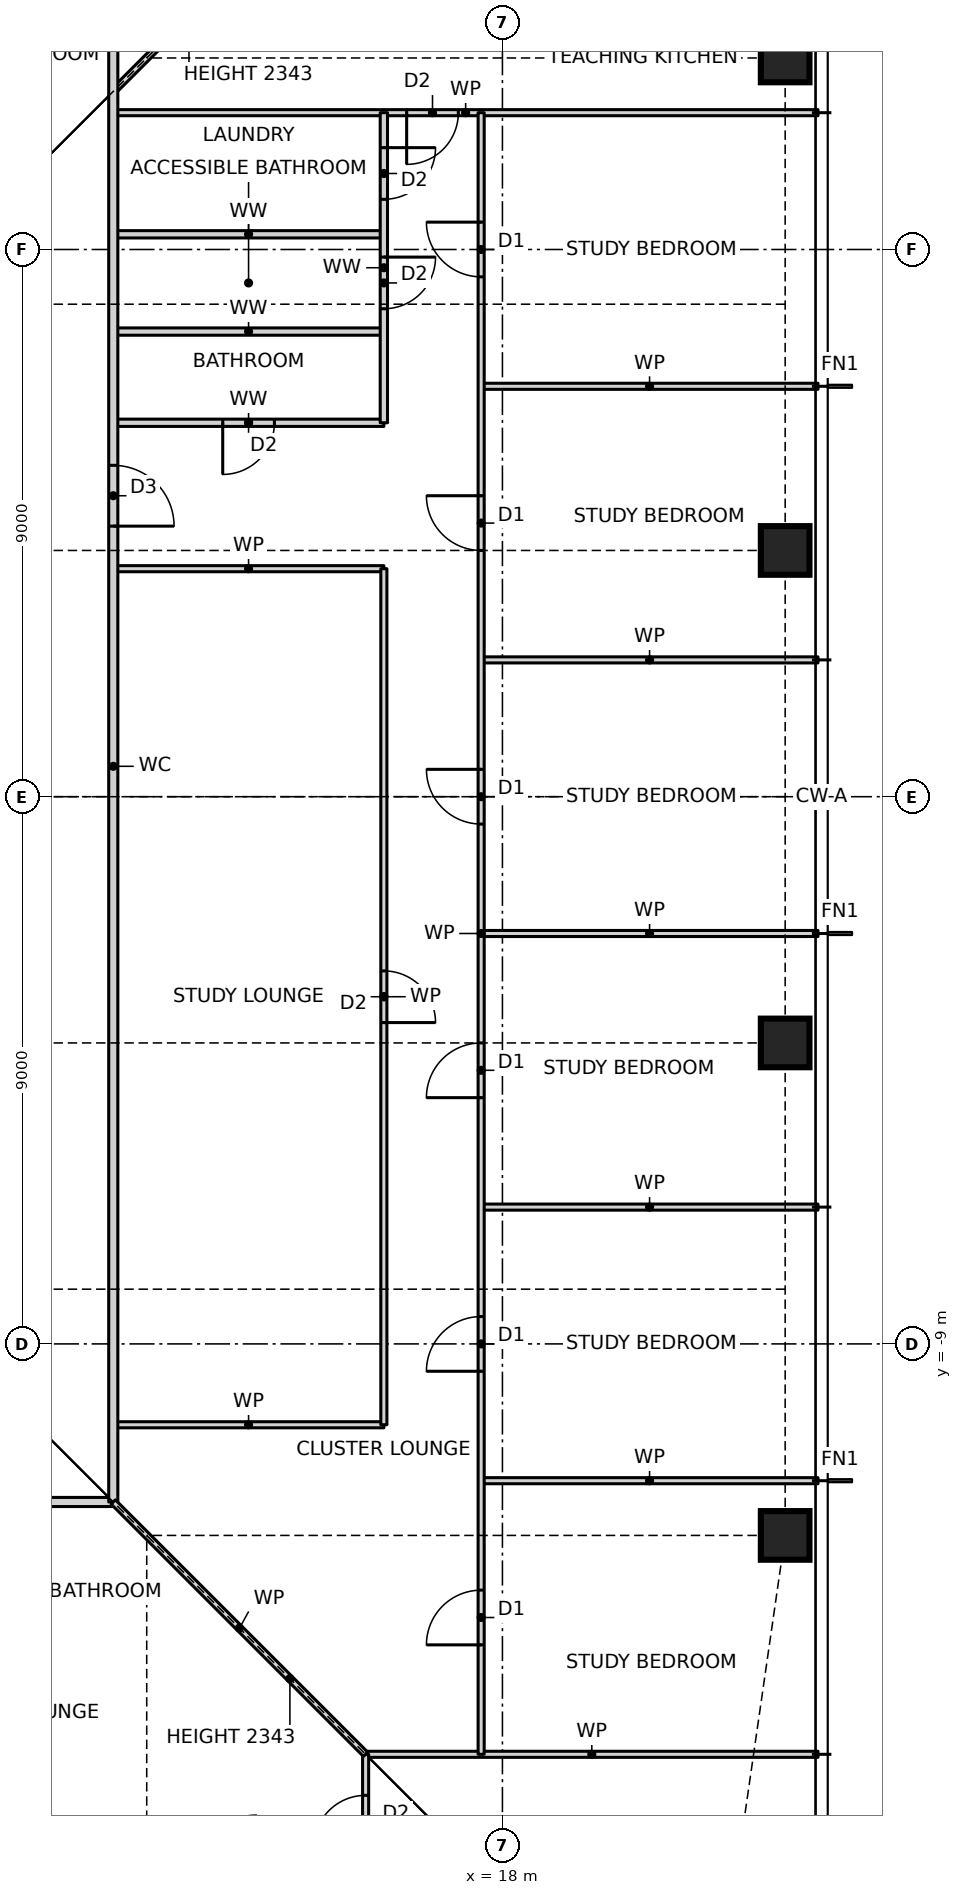
"""IFC4 building model, lengths in metres.
Left out: names, types, materials, properties, quantities, classifications, styles, units other than length and angle.
Written with IfcOpenShell. Run it as: python <this file> out.ifc"""

import sys

from ifc_helpers import new_model, si_unit, direction, frame, frame_2d, origin, origin_2d, place, context, subcontext, project, spatial, rectangle, hollow_rectangle, extrude, element, fill, save


model = new_model("IFC4")
c1 = context("Model", 3, precision=1e-05, world=origin(), true_north=direction((0.0, 1.0)))
c2 = subcontext(c1, "Body", "Model", "MODEL_VIEW")
j1 = project(units=[si_unit("LENGTHUNIT", "METRE"), si_unit("PLANEANGLEUNIT", "RADIAN")], contexts=[c1])
p1 = place(None, origin())
s1 = spatial("IfcSite", under=j1, at=p1, CompositionType="ELEMENT")
p2 = place(p1, origin())
s2 = spatial("IfcBuilding", under=s1, at=p2, CompositionType="ELEMENT")
p3 = place(p2, frame((0.0, 0.0, 57.0)))
s3 = spatial("IfcBuildingStorey", under=s2, at=p3, CompositionType="ELEMENT", Elevation=57.0)
for number, where, z_axis, x_axis in (
    (1, (22.65, -12.15, 0.0), (0.0, 0.0, 1.0), (1.0, 0.0, 0.0)),
    (2, (22.65, -4.05, 0.0), (0.0, 0.0, 1.0), (1.0, 0.0, 0.0)),
    (3, (22.65, 4.05, 0.0), (0.0, 0.0, 1.0), (1.0, 0.0, 0.0)),
    (4, (22.65, 12.15, 0.0), (0.0, 0.0, 1.0), (1.0, 0.0, 0.0)),
):
    element("IfcColumn", number, at=place(p3, frame(where, z_axis=z_axis, x_axis=x_axis)), inside=s3, PredefinedType="COLUMN", context=c2, shape_type="SweptSolid", body=[
        extrude(hollow_rectangle(XDim=0.8, YDim=0.8, WallThickness=0.09, at=origin_2d()), origin(), (0.0, 0.0, 1.0), 3.5),
    ])
p4 = place(p3, frame((15.75, -15.75, 0.0), z_axis=(0.0, 0.0, 1.0), x_axis=(1.0, 0.0, 0.0)))
e5 = element("IfcWall", 5, at=p4, inside=s3, PredefinedType="PARTITIONING", context=c2, shape_type="SweptSolid", body=[
    extrude(rectangle(XDim=7.44, YDim=0.1, at=frame_2d((3.72, 0.0))), origin(), (0.0, 0.0, 1.0), 3.27),
])
p5 = place(p3, frame((-11.6, -11.6, 0.0), z_axis=(0.0, 0.0, 1.0), x_axis=(1.0, 0.0, 0.0)))
e6 = element("IfcWall", 6, at=p5, inside=s3, PredefinedType="PARTITIONING", context=c2, shape_type="SweptSolid", body=[
    extrude(rectangle(XDim=23.2, YDim=0.15, at=frame_2d((11.6, 0.0))), origin(), (0.0, 0.0, 1.0), 3.27),
])
p6 = place(p5, frame((1.755, 0.0, 0.0)))
e7 = element("IfcOpeningElement", 7, at=p6, cuts=e6, PredefinedType="OPENING", context=c2, shape_type="SweptSolid", body=[
    extrude(rectangle(XDim=1.0, YDim=2.1, at=frame_2d((0.5, 1.05))), frame((0.0, 0.085, 0.0), z_axis=(0.0, -1.0, 0.0), x_axis=(1.0, 0.0, 0.0)), (0.0, 0.0, 1.0), 0.17),
])
p7 = place(p5, frame((21.025, 0.0, 0.0)))
e8 = element("IfcOpeningElement", 8, at=p7, cuts=e6, PredefinedType="OPENING", context=c2, shape_type="SweptSolid", body=[
    extrude(rectangle(XDim=1.0, YDim=2.1, at=frame_2d((0.5, 1.05))), frame((0.0, 0.085, 0.0), z_axis=(0.0, -1.0, 0.0), x_axis=(1.0, 0.0, 0.0)), (0.0, 0.0, 1.0), 0.17),
])
p8 = place(p3, frame((17.65, -11.25, 0.0), z_axis=(0.0, 0.0, 1.0), x_axis=(1.0, 0.0, 0.0)))
e9 = element("IfcWall", 9, at=p8, inside=s3, PredefinedType="PARTITIONING", context=c2, shape_type="SweptSolid", body=[
    extrude(rectangle(XDim=5.54, YDim=0.1, at=frame_2d((2.77, 0.0))), origin(), (0.0, 0.0, 1.0), 3.27),
])
p9 = place(p3, frame((11.6, -10.33, 0.0), z_axis=(0.0, 0.0, 1.0), x_axis=(1.0, 0.0, 0.0)))
e10 = element("IfcWall", 10, at=p9, inside=s3, PredefinedType="PARTITIONING", context=c2, shape_type="SweptSolid", body=[
    extrude(rectangle(XDim=4.45, YDim=0.1, at=frame_2d((2.225, 0.0))), origin(), (0.0, 0.0, 1.0), 3.27),
])
for number, where, z_axis, x_axis in (
    (11, (17.65, -6.75, 0.0), (0.0, 0.0, 1.0), (1.0, 0.0, 0.0)),
    (12, (17.65, -2.25, 0.0), (0.0, 0.0, 1.0), (1.0, 0.0, 0.0)),
    (13, (17.65, 2.25, 0.0), (0.0, 0.0, 1.0), (1.0, 0.0, 0.0)),
):
    element("IfcWall", number, at=place(p3, frame(where, z_axis=z_axis, x_axis=x_axis)), inside=s3, PredefinedType="PARTITIONING", context=c2, shape_type="SweptSolid", body=[
        extrude(rectangle(XDim=5.54, YDim=0.1, at=frame_2d((2.77, 0.0))), origin(), (0.0, 0.0, 1.0), 3.27),
    ])
p10 = place(p3, frame((11.6, 3.75, 0.0), z_axis=(0.0, 0.0, 1.0), x_axis=(1.0, 0.0, 0.0)))
e14 = element("IfcWall", 14, at=p10, inside=s3, PredefinedType="PARTITIONING", context=c2, shape_type="SweptSolid", body=[
    extrude(rectangle(XDim=4.45, YDim=0.1, at=frame_2d((2.225, 0.0))), origin(), (0.0, 0.0, 1.0), 3.27),
])
p11 = place(p3, frame((11.6, 6.15, 0.0), z_axis=(0.0, 0.0, 1.0), x_axis=(1.0, 0.0, 0.0)))
e15 = element("IfcWall", 15, at=p11, inside=s3, PredefinedType="PARTITIONING", context=c2, shape_type="SweptSolid", body=[
    extrude(rectangle(XDim=4.45, YDim=0.12, at=frame_2d((2.225, 0.0))), origin(), (0.0, 0.0, 1.0), 3.27),
])
p12 = place(p11, frame((1.8, 0.0, 0.0)))
e16 = element("IfcOpeningElement", 16, at=p12, cuts=e15, PredefinedType="OPENING", context=c2, shape_type="SweptSolid", body=[
    extrude(rectangle(XDim=0.85, YDim=2.1, at=frame_2d((0.425, 1.05))), frame((0.0, 0.07, 0.0), z_axis=(0.0, -1.0, 0.0), x_axis=(1.0, 0.0, 0.0)), (0.0, 0.0, 1.0), 0.14),
])
p13 = place(p3, frame((17.65, 6.75, 0.0), z_axis=(0.0, 0.0, 1.0), x_axis=(1.0, 0.0, 0.0)))
e17 = element("IfcWall", 17, at=p13, inside=s3, PredefinedType="PARTITIONING", context=c2, shape_type="SweptSolid", body=[
    extrude(rectangle(XDim=5.54, YDim=0.1, at=frame_2d((2.77, 0.0))), origin(), (0.0, 0.0, 1.0), 3.27),
])
for number, where, z_axis, x_axis in (
    (18, (11.6, 7.65, 0.0), (0.0, 0.0, 1.0), (1.0, 0.0, 0.0)),
    (19, (11.6, 9.25, 0.0), (0.0, 0.0, 1.0), (1.0, 0.0, 0.0)),
):
    element("IfcWall", number, at=place(p3, frame(where, z_axis=z_axis, x_axis=x_axis)), inside=s3, PredefinedType="PARTITIONING", context=c2, shape_type="SweptSolid", body=[
        extrude(rectangle(XDim=4.45, YDim=0.12, at=frame_2d((2.225, 0.0))), origin(), (0.0, 0.0, 1.0), 3.27),
    ])
p14 = place(p3, frame((11.6, 11.25, 0.0), z_axis=(0.0, 0.0, 1.0), x_axis=(1.0, 0.0, 0.0)))
e20 = element("IfcWall", 20, at=p14, inside=s3, PredefinedType="PARTITIONING", context=c2, shape_type="SweptSolid", body=[
    extrude(rectangle(XDim=11.59, YDim=0.1, at=frame_2d((5.795, 0.0))), origin(), (0.0, 0.0, 1.0), 3.27),
])
p15 = place(p14, frame((4.825, 0.0, 0.0)))
e21 = element("IfcOpeningElement", 21, at=p15, cuts=e20, PredefinedType="OPENING", context=c2, shape_type="SweptSolid", body=[
    extrude(rectangle(XDim=0.85, YDim=2.1, at=frame_2d((0.425, 1.05))), frame((0.0, 0.06, 0.0), z_axis=(0.0, -1.0, 0.0), x_axis=(1.0, 0.0, 0.0)), (0.0, 0.0, 1.0), 0.12),
])
p16 = place(p3, frame((11.6, 11.6, 0.0), z_axis=(0.0, 0.0, 1.0), x_axis=(0.707106781187, 0.707106781187, 0.0)))
e22 = element("IfcWall", 22, at=p16, inside=s3, PredefinedType="PARTITIONING", context=c2, shape_type="SweptSolid", body=[
    extrude(rectangle(XDim=5.869, YDim=0.1, at=frame_2d((2.935, 0.0))), origin(), (0.0, 0.0, 1.0), 2.343),
])
p17 = place(p3, frame((17.65, -15.75, 0.0), z_axis=(0.0, 0.0, 1.0), x_axis=(0.0, 1.0, 0.0)))
e23 = element("IfcWall", 23, at=p17, inside=s3, PredefinedType="PARTITIONING", context=c2, shape_type="SweptSolid", body=[
    extrude(rectangle(XDim=27.0, YDim=0.1, at=frame_2d((13.5, 0.0))), origin(), (0.0, 0.0, 1.0), 3.27),
])
p18 = place(p17, frame((1.8, 0.0, 0.0)))
e24 = element("IfcOpeningElement", 24, at=p18, cuts=e23, PredefinedType="OPENING", context=c2, shape_type="SweptSolid", body=[
    extrude(rectangle(XDim=0.9, YDim=2.1, at=frame_2d((0.45, 1.05))), frame((0.0, 0.06, 0.0), z_axis=(0.0, -1.0, 0.0), x_axis=(1.0, 0.0, 0.0)), (0.0, 0.0, 1.0), 0.12),
])
p19 = place(p17, frame((6.3, 0.0, 0.0)))
e25 = element("IfcOpeningElement", 25, at=p19, cuts=e23, PredefinedType="OPENING", context=c2, shape_type="SweptSolid", body=[
    extrude(rectangle(XDim=0.9, YDim=2.1, at=frame_2d((0.45, 1.05))), frame((0.0, 0.06, 0.0), z_axis=(0.0, -1.0, 0.0), x_axis=(1.0, 0.0, 0.0)), (0.0, 0.0, 1.0), 0.12),
])
p20 = place(p17, frame((10.8, 0.0, 0.0)))
e26 = element("IfcOpeningElement", 26, at=p20, cuts=e23, PredefinedType="OPENING", context=c2, shape_type="SweptSolid", body=[
    extrude(rectangle(XDim=0.9, YDim=2.1, at=frame_2d((0.45, 1.05))), frame((0.0, 0.06, 0.0), z_axis=(0.0, -1.0, 0.0), x_axis=(1.0, 0.0, 0.0)), (0.0, 0.0, 1.0), 0.12),
])
p21 = place(p17, frame((15.3, 0.0, 0.0)))
e27 = element("IfcOpeningElement", 27, at=p21, cuts=e23, PredefinedType="OPENING", context=c2, shape_type="SweptSolid", body=[
    extrude(rectangle(XDim=0.9, YDim=2.1, at=frame_2d((0.45, 1.05))), frame((0.0, 0.06, 0.0), z_axis=(0.0, -1.0, 0.0), x_axis=(1.0, 0.0, 0.0)), (0.0, 0.0, 1.0), 0.12),
])
p22 = place(p17, frame((19.8, 0.0, 0.0)))
e28 = element("IfcOpeningElement", 28, at=p22, cuts=e23, PredefinedType="OPENING", context=c2, shape_type="SweptSolid", body=[
    extrude(rectangle(XDim=0.9, YDim=2.1, at=frame_2d((0.45, 1.05))), frame((0.0, 0.06, 0.0), z_axis=(0.0, -1.0, 0.0), x_axis=(1.0, 0.0, 0.0)), (0.0, 0.0, 1.0), 0.12),
])
p23 = place(p17, frame((24.3, 0.0, 0.0)))
e29 = element("IfcOpeningElement", 29, at=p23, cuts=e23, PredefinedType="OPENING", context=c2, shape_type="SweptSolid", body=[
    extrude(rectangle(XDim=0.9, YDim=2.1, at=frame_2d((0.45, 1.05))), frame((0.0, 0.06, 0.0), z_axis=(0.0, -1.0, 0.0), x_axis=(1.0, 0.0, 0.0)), (0.0, 0.0, 1.0), 0.12),
])
p24 = place(p3, frame((16.05, -10.33, 0.0), z_axis=(0.0, 0.0, 1.0), x_axis=(0.0, 1.0, 0.0)))
e30 = element("IfcWall", 30, at=p24, inside=s3, PredefinedType="PARTITIONING", context=c2, shape_type="SweptSolid", body=[
    extrude(rectangle(XDim=14.08, YDim=0.1, at=frame_2d((7.04, 0.0))), origin(), (0.0, 0.0, 1.0), 3.27),
])
p25 = place(p24, frame((6.615, 0.0, 0.0)))
e31 = element("IfcOpeningElement", 31, at=p25, cuts=e30, PredefinedType="OPENING", context=c2, shape_type="SweptSolid", body=[
    extrude(rectangle(XDim=0.85, YDim=2.1, at=frame_2d((0.425, 1.05))), frame((0.0, 0.06, 0.0), z_axis=(0.0, -1.0, 0.0), x_axis=(1.0, 0.0, 0.0)), (0.0, 0.0, 1.0), 0.12),
])
p26 = place(p3, frame((16.05, 6.15, 0.0), z_axis=(0.0, 0.0, 1.0), x_axis=(0.0, 1.0, 0.0)))
e32 = element("IfcWall", 32, at=p26, inside=s3, PredefinedType="PARTITIONING", context=c2, shape_type="SweptSolid", body=[
    extrude(rectangle(XDim=5.1, YDim=0.12, at=frame_2d((2.55, 0.0))), origin(), (0.0, 0.0, 1.0), 3.27),
])
p27 = place(p26, frame((1.875, 0.0, 0.0)))
e33 = element("IfcOpeningElement", 33, at=p27, cuts=e32, PredefinedType="OPENING", context=c2, shape_type="SweptSolid", body=[
    extrude(rectangle(XDim=0.85, YDim=2.1, at=frame_2d((0.425, 1.05))), frame((0.0, 0.07, 0.0), z_axis=(0.0, -1.0, 0.0), x_axis=(1.0, 0.0, 0.0)), (0.0, 0.0, 1.0), 0.14),
])
p28 = place(p26, frame((3.675, 0.0, 0.0)))
e34 = element("IfcOpeningElement", 34, at=p28, cuts=e32, PredefinedType="OPENING", context=c2, shape_type="SweptSolid", body=[
    extrude(rectangle(XDim=0.85, YDim=2.1, at=frame_2d((0.425, 1.05))), frame((0.0, 0.07, 0.0), z_axis=(0.0, -1.0, 0.0), x_axis=(1.0, 0.0, 0.0)), (0.0, 0.0, 1.0), 0.14),
])
p29 = place(p3, frame((15.75, -23.19, 0.0), z_axis=(0.0, 0.0, 1.0), x_axis=(0.0, 1.0, 0.0)))
e35 = element("IfcWall", 35, at=p29, inside=s3, PredefinedType="PARTITIONING", context=c2, shape_type="SweptSolid", body=[
    extrude(rectangle(XDim=7.44, YDim=0.1, at=frame_2d((3.72, 0.0))), origin(), (0.0, 0.0, 1.0), 3.27),
])
p30 = place(p29, frame((5.915, 0.0, 0.0)))
e36 = element("IfcOpeningElement", 36, at=p30, cuts=e35, PredefinedType="OPENING", context=c2, shape_type="SweptSolid", body=[
    extrude(rectangle(XDim=0.85, YDim=2.1, at=frame_2d((0.425, 1.05))), frame((0.0, 0.06, 0.0), z_axis=(0.0, -1.0, 0.0), x_axis=(1.0, 0.0, 0.0)), (0.0, 0.0, 1.0), 0.12),
])
p31 = place(p3, frame((11.6, -11.6, 0.0), z_axis=(0.0, 0.0, 1.0), x_axis=(0.0, 1.0, 0.0)))
e37 = element("IfcWall", 37, at=p31, inside=s3, PredefinedType="PARTITIONING", context=c2, shape_type="SweptSolid", body=[
    extrude(rectangle(XDim=24.2, YDim=0.15, at=frame_2d((12.1, 0.0))), origin(), (0.0, 0.0, 1.0), 3.27),
])
p32 = place(p31, frame((16.05, 0.0, 0.0)))
e38 = element("IfcOpeningElement", 38, at=p32, cuts=e37, PredefinedType="OPENING", context=c2, shape_type="SweptSolid", body=[
    extrude(rectangle(XDim=1.0, YDim=2.1, at=frame_2d((0.5, 1.05))), frame((0.0, 0.085, 0.0), z_axis=(0.0, -1.0, 0.0), x_axis=(1.0, 0.0, 0.0)), (0.0, 0.0, 1.0), 0.17),
])
p33 = place(p3, frame((15.75, -15.75, 0.0), z_axis=(0.0, 0.0, 1.0), x_axis=(-0.707106781187, 0.707106781187, 0.0)))
e39 = element("IfcWall", 39, at=p33, inside=s3, PredefinedType="PARTITIONING", context=c2, shape_type="SweptSolid", body=[
    extrude(rectangle(XDim=5.869, YDim=0.1, at=frame_2d((2.935, 0.0))), origin(), (0.0, 0.0, 1.0), 2.343),
])
p34 = place(p18, origin())
e40 = element("IfcDoor", 40, at=p34, inside=s3, OperationType="SINGLE_SWING_LEFT", PredefinedType="DOOR", context=c2, shape_type="SweptSolid", body=[
    extrude(rectangle(XDim=0.9, YDim=2.1, at=frame_2d((0.45, 1.05))), frame((0.0, 0.025, 0.0), z_axis=(0.0, -1.0, 0.0), x_axis=(1.0, 0.0, 0.0)), (0.0, 0.0, 1.0), 0.05),
])
fill(e24, e40)
p35 = place(p19, origin())
e41 = element("IfcDoor", 41, at=p35, inside=s3, OperationType="SINGLE_SWING_LEFT", PredefinedType="DOOR", context=c2, shape_type="SweptSolid", body=[
    extrude(rectangle(XDim=0.9, YDim=2.1, at=frame_2d((0.45, 1.05))), frame((0.0, 0.025, 0.0), z_axis=(0.0, -1.0, 0.0), x_axis=(1.0, 0.0, 0.0)), (0.0, 0.0, 1.0), 0.05),
])
fill(e25, e41)
p36 = place(p20, origin())
e42 = element("IfcDoor", 42, at=p36, inside=s3, OperationType="SINGLE_SWING_LEFT", PredefinedType="DOOR", context=c2, shape_type="SweptSolid", body=[
    extrude(rectangle(XDim=0.9, YDim=2.1, at=frame_2d((0.45, 1.05))), frame((0.0, 0.025, 0.0), z_axis=(0.0, -1.0, 0.0), x_axis=(1.0, 0.0, 0.0)), (0.0, 0.0, 1.0), 0.05),
])
fill(e26, e42)
p37 = place(p21, origin())
e43 = element("IfcDoor", 43, at=p37, inside=s3, OperationType="SINGLE_SWING_RIGHT", PredefinedType="DOOR", context=c2, shape_type="SweptSolid", body=[
    extrude(rectangle(XDim=0.9, YDim=2.1, at=frame_2d((0.45, 1.05))), frame((0.0, 0.025, 0.0), z_axis=(0.0, -1.0, 0.0), x_axis=(1.0, 0.0, 0.0)), (0.0, 0.0, 1.0), 0.05),
])
fill(e27, e43)
p38 = place(p22, origin())
e44 = element("IfcDoor", 44, at=p38, inside=s3, OperationType="SINGLE_SWING_RIGHT", PredefinedType="DOOR", context=c2, shape_type="SweptSolid", body=[
    extrude(rectangle(XDim=0.9, YDim=2.1, at=frame_2d((0.45, 1.05))), frame((0.0, 0.025, 0.0), z_axis=(0.0, -1.0, 0.0), x_axis=(1.0, 0.0, 0.0)), (0.0, 0.0, 1.0), 0.05),
])
fill(e28, e44)
p39 = place(p23, origin())
e45 = element("IfcDoor", 45, at=p39, inside=s3, OperationType="SINGLE_SWING_RIGHT", PredefinedType="DOOR", context=c2, shape_type="SweptSolid", body=[
    extrude(rectangle(XDim=0.9, YDim=2.1, at=frame_2d((0.45, 1.05))), frame((0.0, 0.025, 0.0), z_axis=(0.0, -1.0, 0.0), x_axis=(1.0, 0.0, 0.0)), (0.0, 0.0, 1.0), 0.05),
])
fill(e29, e45)
p40 = place(p32, frame((1.0, 0.0, 0.0), z_axis=(0.0, 0.0, 1.0), x_axis=(-1.0, 0.0, 0.0)))
e46 = element("IfcDoor", 46, at=p40, inside=s3, OperationType="SINGLE_SWING_RIGHT", PredefinedType="DOOR", context=c2, shape_type="SweptSolid", body=[
    extrude(rectangle(XDim=1.0, YDim=2.1, at=frame_2d((0.5, 1.05))), frame((0.0, 0.025, 0.0), z_axis=(0.0, -1.0, 0.0), x_axis=(1.0, 0.0, 0.0)), (0.0, 0.0, 1.0), 0.05),
])
fill(e38, e46)
p41 = place(p25, frame((0.85, 0.0, 0.0), z_axis=(0.0, 0.0, 1.0), x_axis=(-1.0, 0.0, 0.0)))
e47 = element("IfcDoor", 47, at=p41, inside=s3, OperationType="SINGLE_SWING_RIGHT", PredefinedType="DOOR", context=c2, shape_type="SweptSolid", body=[
    extrude(rectangle(XDim=0.85, YDim=2.1, at=frame_2d((0.425, 1.05))), frame((0.0, 0.025, 0.0), z_axis=(0.0, -1.0, 0.0), x_axis=(1.0, 0.0, 0.0)), (0.0, 0.0, 1.0), 0.05),
])
fill(e31, e47)
p42 = place(p12, frame((0.85, 0.0, 0.0), z_axis=(0.0, 0.0, 1.0), x_axis=(-1.0, 0.0, 0.0)))
e48 = element("IfcDoor", 48, at=p42, inside=s3, OperationType="SINGLE_SWING_RIGHT", PredefinedType="DOOR", context=c2, shape_type="SweptSolid", body=[
    extrude(rectangle(XDim=0.85, YDim=2.1, at=frame_2d((0.425, 1.05))), frame((0.0, 0.025, 0.0), z_axis=(0.0, -1.0, 0.0), x_axis=(1.0, 0.0, 0.0)), (0.0, 0.0, 1.0), 0.05),
])
fill(e16, e48)
p43 = place(p27, frame((0.85, 0.0, 0.0), z_axis=(0.0, 0.0, 1.0), x_axis=(-1.0, 0.0, 0.0)))
e49 = element("IfcDoor", 49, at=p43, inside=s3, OperationType="SINGLE_SWING_LEFT", PredefinedType="DOOR", context=c2, shape_type="SweptSolid", body=[
    extrude(rectangle(XDim=0.85, YDim=2.1, at=frame_2d((0.425, 1.05))), frame((0.0, 0.025, 0.0), z_axis=(0.0, -1.0, 0.0), x_axis=(1.0, 0.0, 0.0)), (0.0, 0.0, 1.0), 0.05),
])
fill(e33, e49)
p44 = place(p28, frame((0.85, 0.0, 0.0), z_axis=(0.0, 0.0, 1.0), x_axis=(-1.0, 0.0, 0.0)))
e50 = element("IfcDoor", 50, at=p44, inside=s3, OperationType="SINGLE_SWING_LEFT", PredefinedType="DOOR", context=c2, shape_type="SweptSolid", body=[
    extrude(rectangle(XDim=0.85, YDim=2.1, at=frame_2d((0.425, 1.05))), frame((0.0, 0.025, 0.0), z_axis=(0.0, -1.0, 0.0), x_axis=(1.0, 0.0, 0.0)), (0.0, 0.0, 1.0), 0.05),
])
fill(e34, e50)
p45 = place(p15, frame((0.85, 0.0, 0.0), z_axis=(0.0, 0.0, 1.0), x_axis=(-1.0, 0.0, 0.0)))
e51 = element("IfcDoor", 51, at=p45, inside=s3, OperationType="SINGLE_SWING_RIGHT", PredefinedType="DOOR", context=c2, shape_type="SweptSolid", body=[
    extrude(rectangle(XDim=0.85, YDim=2.1, at=frame_2d((0.425, 1.05))), frame((0.0, 0.025, 0.0), z_axis=(0.0, -1.0, 0.0), x_axis=(1.0, 0.0, 0.0)), (0.0, 0.0, 1.0), 0.05),
])
fill(e21, e51)
p46 = place(p30, origin())
e52 = element("IfcDoor", 52, at=p46, inside=s3, OperationType="SINGLE_SWING_LEFT", PredefinedType="DOOR", context=c2, shape_type="SweptSolid", body=[
    extrude(rectangle(XDim=0.85, YDim=2.1, at=frame_2d((0.425, 1.05))), frame((0.0, 0.025, 0.0), z_axis=(0.0, -1.0, 0.0), x_axis=(1.0, 0.0, 0.0)), (0.0, 0.0, 1.0), 0.05),
])
fill(e36, e52)
save(model, sys.argv[1])
